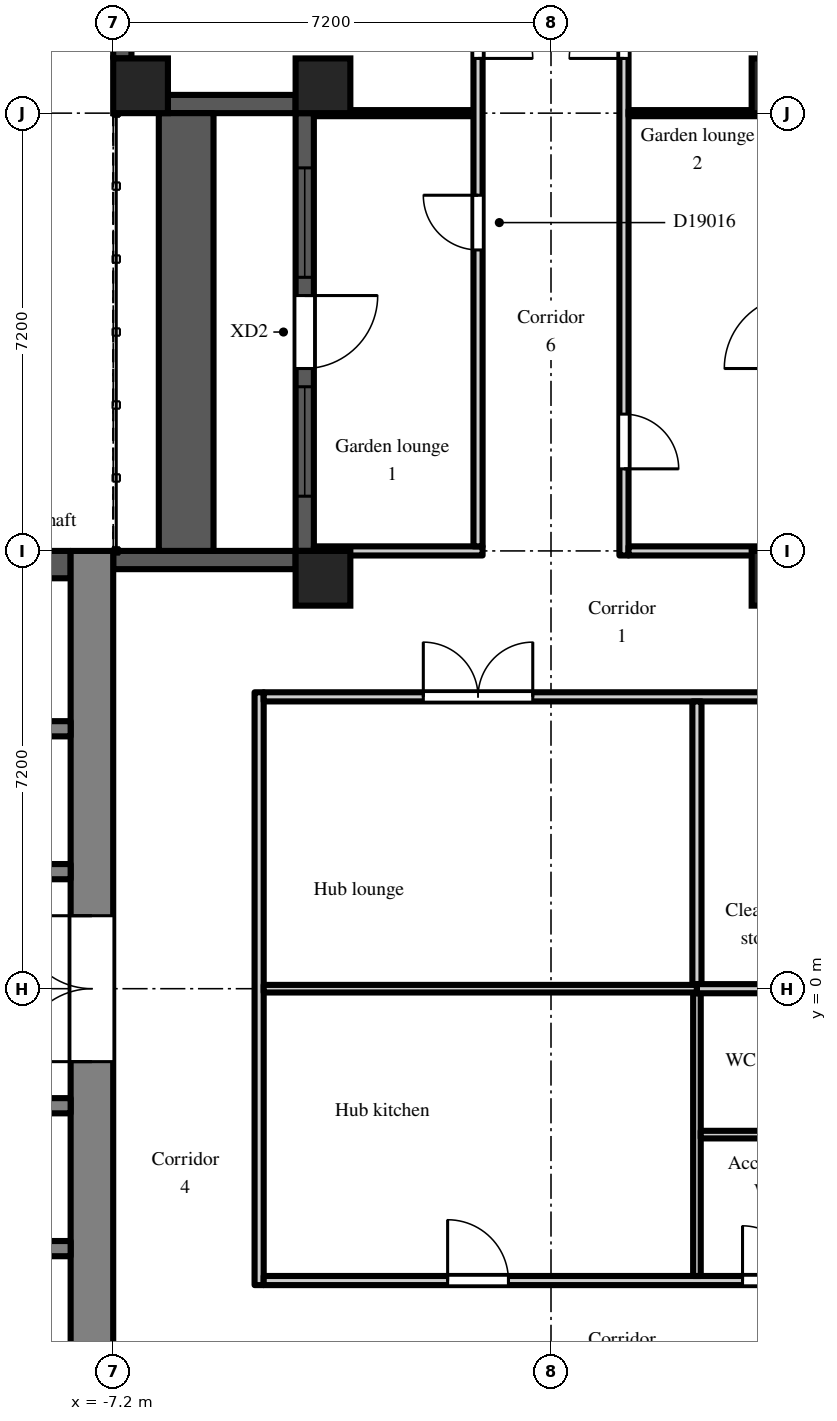
"""IFC4 building model, lengths in metres.
Left out: names, types, materials, properties, quantities, classifications, styles, units other than length and angle.
Written with IfcOpenShell. Run it as: python <this file> out.ifc"""

import sys

from ifc_helpers import new_model, si_unit, direction, frame, frame_2d, origin, origin_2d, place, context, subcontext, project, spatial, rectangle, extrude, element, fill, save


model = new_model("IFC4")
c1 = context("Model", 3, precision=1e-05, world=origin(), true_north=direction((0.0, 1.0)))
c2 = subcontext(c1, "Body", "Model", "MODEL_VIEW")
j1 = project(units=[si_unit("LENGTHUNIT", "METRE"), si_unit("PLANEANGLEUNIT", "RADIAN")], contexts=[c1])
p1 = place(None, origin())
s1 = spatial("IfcSite", under=j1, at=p1, CompositionType="ELEMENT")
p2 = place(p1, origin())
s2 = spatial("IfcBuilding", under=s1, at=p2, CompositionType="ELEMENT")
p3 = place(p2, frame((0.0, 0.0, 129.3)))
s3 = spatial("IfcBuildingStorey", under=s2, at=p3, CompositionType="ELEMENT", Elevation=129.3)
for number, where, z_axis, x_axis in (
    (1, (-6.75, 14.85, 0.0), (0.0, 0.0, 1.0), (1.0, 0.0, 0.0)),
    (2, (-3.75, 6.75, 0.0), (0.0, 0.0, 1.0), (1.0, 0.0, 0.0)),
    (3, (-3.75, 14.85, 0.0), (0.0, 0.0, 1.0), (1.0, 0.0, 0.0)),
    (4, (3.75, 6.75, 0.0), (0.0, 0.0, 1.0), (1.0, 0.0, 0.0)),
    (5, (3.75, 14.85, 0.0), (0.0, 0.0, 1.0), (1.0, 0.0, 0.0)),
):
    element("IfcColumn", number, at=place(p3, frame(where, z_axis=z_axis, x_axis=x_axis)), inside=s3, PredefinedType="COLUMN", context=c2, shape_type="SweptSolid", body=[
        extrude(rectangle(XDim=0.9, YDim=0.9, at=origin_2d()), origin(), (0.0, 0.0, 1.0), 3.0),
    ])
p4 = place(p3, frame((-7.05, 17.1, 0.0), z_axis=(0.0, 0.0, 1.0), x_axis=(0.0, -1.0, 0.0)))
e6 = element("IfcWall", 6, at=p4, inside=s3, PredefinedType="SOLIDWALL", context=c2, shape_type="SweptSolid", body=[
    extrude(rectangle(XDim=1.8, YDim=0.3, at=frame_2d((0.9, 0.0))), origin(), (0.0, 0.0, 1.0), 2.2),
])
p5 = place(p4, frame((0.3, 0.0, 0.2)))
e7 = element("IfcOpeningElement", 7, at=p5, cuts=e6, PredefinedType="OPENING", context=c2, shape_type="SweptSolid", body=[
    extrude(rectangle(XDim=1.2, YDim=1.85, at=frame_2d((0.6, 0.925))), frame((0.0, 0.16, 0.0), z_axis=(0.0, -1.0, 0.0), x_axis=(1.0, 0.0, 0.0)), (0.0, 0.0, 1.0), 0.32),
])
p6 = place(p3, frame((-6.3, 14.55, 0.0), z_axis=(0.0, 0.0, 1.0), x_axis=(1.0, 0.0, 0.0)))
e8 = element("IfcWall", 8, at=p6, inside=s3, PredefinedType="SOLIDWALL", context=c2, shape_type="SweptSolid", body=[
    extrude(rectangle(XDim=2.1, YDim=0.3, at=frame_2d((1.05, 0.0))), origin(), (0.0, 0.0, 1.0), 2.2),
])
p7 = place(p3, frame((-4.05, 14.4, 0.0), z_axis=(0.0, 0.0, 1.0), x_axis=(0.0, -1.0, 0.0)))
e9 = element("IfcWall", 9, at=p7, inside=s3, PredefinedType="SOLIDWALL", context=c2, shape_type="SweptSolid", body=[
    extrude(rectangle(XDim=7.2, YDim=0.3, at=frame_2d((3.6, 0.0))), origin(), (0.0, 0.0, 1.0), 2.2),
])
p8 = place(p7, frame((3.0, 0.0, 0.0)))
e10 = element("IfcOpeningElement", 10, at=p8, cuts=e9, PredefinedType="OPENING", context=c2, shape_type="SweptSolid", body=[
    extrude(rectangle(XDim=1.2, YDim=2.05, at=frame_2d((0.6, 1.025))), frame((0.0, 0.16, 0.0), z_axis=(0.0, -1.0, 0.0), x_axis=(1.0, 0.0, 0.0)), (0.0, 0.0, 1.0), 0.32),
])
p9 = place(p7, frame((0.9, 0.0, 0.2)))
e11 = element("IfcOpeningElement", 11, at=p9, cuts=e9, PredefinedType="OPENING", context=c2, shape_type="SweptSolid", body=[
    extrude(rectangle(XDim=1.8, YDim=1.85, at=frame_2d((0.9, 0.925))), frame((0.0, 0.16, 0.0), z_axis=(0.0, -1.0, 0.0), x_axis=(1.0, 0.0, 0.0)), (0.0, 0.0, 1.0), 0.32),
])
p10 = place(p7, frame((4.5, 0.0, 0.2)))
e12 = element("IfcOpeningElement", 12, at=p10, cuts=e9, PredefinedType="OPENING", context=c2, shape_type="SweptSolid", body=[
    extrude(rectangle(XDim=1.8, YDim=1.85, at=frame_2d((0.9, 0.925))), frame((0.0, 0.16, 0.0), z_axis=(0.0, -1.0, 0.0), x_axis=(1.0, 0.0, 0.0)), (0.0, 0.0, 1.0), 0.32),
])
p11 = place(p3, frame((-4.2, 7.05, 0.0), z_axis=(0.0, 0.0, 1.0), x_axis=(-1.0, 0.0, 0.0)))
e13 = element("IfcWall", 13, at=p11, inside=s3, PredefinedType="SOLIDWALL", context=c2, shape_type="SweptSolid", body=[
    extrude(rectangle(XDim=3.0, YDim=0.3, at=frame_2d((1.5, 0.0))), origin(), (0.0, 0.0, 1.0), 2.2),
])
p12 = place(p3, frame((-6.0, 7.2, 0.0), z_axis=(0.0, 0.0, 1.0), x_axis=(0.0, 1.0, 0.0)))
e14 = element("IfcWall", 14, at=p12, inside=s3, PredefinedType="PARAPET", context=c2, shape_type="SweptSolid", body=[
    extrude(rectangle(XDim=7.2, YDim=0.9, at=frame_2d((3.6, 0.0))), origin(), (0.0, 0.0, 1.0), 0.8),
])
p13 = place(p3, frame((-7.55, -7.2, 0.0), z_axis=(0.0, 0.0, 1.0), x_axis=(0.0, 1.0, 0.0)))
e15 = element("IfcWall", 15, at=p13, inside=s3, PredefinedType="SHEAR", context=c2, shape_type="SweptSolid", body=[
    extrude(rectangle(XDim=14.4, YDim=0.7, at=frame_2d((7.2, 0.0))), origin(), (0.0, 0.0, 1.0), 2.6),
])
p14 = place(p13, frame((6.0, 0.0, 0.0)))
e16 = element("IfcOpeningElement", 16, at=p14, cuts=e15, PredefinedType="OPENING", context=c2, shape_type="SweptSolid", body=[
    extrude(rectangle(XDim=2.4, YDim=2.2, at=frame_2d((1.2, 1.1))), frame((0.0, 0.36, 0.0), z_axis=(0.0, -1.0, 0.0), x_axis=(1.0, 0.0, 0.0)), (0.0, 0.0, 1.0), 0.72),
])
p15 = place(p3, frame((-7.9, 6.975, 0.0), z_axis=(0.0, 0.0, 1.0), x_axis=(-1.0, 0.0, 0.0)))
e17 = element("IfcWall", 17, at=p15, inside=s3, PredefinedType="SHEAR", context=c2, shape_type="SweptSolid", body=[
    extrude(rectangle(XDim=12.95, YDim=0.45, at=frame_2d((6.475, 0.0))), origin(), (0.0, 0.0, 1.0), 2.6),
])
p16 = place(p3, frame((-7.9, 1.925, 0.0), z_axis=(0.0, 0.0, 1.0), x_axis=(-1.0, 0.0, 0.0)))
e18 = element("IfcWall", 18, at=p16, inside=s3, PredefinedType="SHEAR", context=c2, shape_type="SweptSolid", body=[
    extrude(rectangle(XDim=12.95, YDim=0.25, at=frame_2d((6.475, 0.0))), origin(), (0.0, 0.0, 1.0), 2.6),
])
p17 = place(p16, frame((4.825, 0.0, 0.0)))
e19 = element("IfcOpeningElement", 19, at=p17, cuts=e18, PredefinedType="OPENING", context=c2, shape_type="SweptSolid", body=[
    extrude(rectangle(XDim=1.1, YDim=2.1, at=frame_2d((0.55, 1.05))), frame((0.0, 0.135, 0.0), z_axis=(0.0, -1.0, 0.0), x_axis=(1.0, 0.0, 0.0)), (0.0, 0.0, 1.0), 0.27),
])
p18 = place(p16, frame((7.025, 0.0, 0.0)))
e20 = element("IfcOpeningElement", 20, at=p18, cuts=e18, PredefinedType="OPENING", context=c2, shape_type="SweptSolid", body=[
    extrude(rectangle(XDim=1.1, YDim=2.1, at=frame_2d((0.55, 1.05))), frame((0.0, 0.135, 0.0), z_axis=(0.0, -1.0, 0.0), x_axis=(1.0, 0.0, 0.0)), (0.0, 0.0, 1.0), 0.27),
])
p19 = place(p16, frame((9.225, 0.0, 0.0)))
e21 = element("IfcOpeningElement", 21, at=p19, cuts=e18, PredefinedType="OPENING", context=c2, shape_type="SweptSolid", body=[
    extrude(rectangle(XDim=1.1, YDim=2.1, at=frame_2d((0.55, 1.05))), frame((0.0, 0.135, 0.0), z_axis=(0.0, -1.0, 0.0), x_axis=(1.0, 0.0, 0.0)), (0.0, 0.0, 1.0), 0.27),
])
p20 = place(p16, frame((0.525, 0.0, 0.0)))
e22 = element("IfcOpeningElement", 22, at=p20, cuts=e18, PredefinedType="OPENING", context=c2, shape_type="SweptSolid", body=[
    extrude(rectangle(XDim=0.9, YDim=2.1, at=frame_2d((0.45, 1.05))), frame((0.0, 0.135, 0.0), z_axis=(0.0, -1.0, 0.0), x_axis=(1.0, 0.0, 0.0)), (0.0, 0.0, 1.0), 0.27),
])
p21 = place(p16, frame((2.625, 0.0, 0.0)))
e23 = element("IfcOpeningElement", 23, at=p21, cuts=e18, PredefinedType="OPENING", context=c2, shape_type="SweptSolid", body=[
    extrude(rectangle(XDim=1.1, YDim=2.1, at=frame_2d((0.55, 1.05))), frame((0.0, 0.135, 0.0), z_axis=(0.0, -1.0, 0.0), x_axis=(1.0, 0.0, 0.0)), (0.0, 0.0, 1.0), 0.27),
])
p22 = place(p16, frame((11.525, 0.0, 0.0)))
e24 = element("IfcOpeningElement", 24, at=p22, cuts=e18, PredefinedType="OPENING", context=c2, shape_type="SweptSolid", body=[
    extrude(rectangle(XDim=0.9, YDim=2.1, at=frame_2d((0.45, 1.05))), frame((0.0, 0.135, 0.0), z_axis=(0.0, -1.0, 0.0), x_axis=(1.0, 0.0, 0.0)), (0.0, 0.0, 1.0), 0.27),
])
p23 = place(p3, frame((-7.9, 4.275, 0.0), z_axis=(0.0, 0.0, 1.0), x_axis=(-1.0, 0.0, 0.0)))
e25 = element("IfcWall", 25, at=p23, inside=s3, PredefinedType="SHEAR", context=c2, shape_type="SweptSolid", body=[
    extrude(rectangle(XDim=1.95, YDim=0.25, at=frame_2d((0.975, 0.0))), origin(), (0.0, 0.0, 1.0), 2.6),
])
p24 = place(p3, frame((-7.9, -1.925, 0.0), z_axis=(0.0, 0.0, 1.0), x_axis=(-1.0, 0.0, 0.0)))
e26 = element("IfcWall", 26, at=p24, inside=s3, PredefinedType="SHEAR", context=c2, shape_type="SweptSolid", body=[
    extrude(rectangle(XDim=12.95, YDim=0.25, at=frame_2d((6.475, 0.0))), origin(), (0.0, 0.0, 1.0), 2.6),
])
p25 = place(p24, frame((0.525, 0.0, 0.0)))
e27 = element("IfcOpeningElement", 27, at=p25, cuts=e26, PredefinedType="OPENING", context=c2, shape_type="SweptSolid", body=[
    extrude(rectangle(XDim=0.9, YDim=2.1, at=frame_2d((0.45, 1.05))), frame((0.0, 0.135, 0.0), z_axis=(0.0, -1.0, 0.0), x_axis=(1.0, 0.0, 0.0)), (0.0, 0.0, 1.0), 0.27),
])
p26 = place(p24, frame((2.625, 0.0, 0.0)))
e28 = element("IfcOpeningElement", 28, at=p26, cuts=e26, PredefinedType="OPENING", context=c2, shape_type="SweptSolid", body=[
    extrude(rectangle(XDim=1.1, YDim=2.1, at=frame_2d((0.55, 1.05))), frame((0.0, 0.135, 0.0), z_axis=(0.0, -1.0, 0.0), x_axis=(1.0, 0.0, 0.0)), (0.0, 0.0, 1.0), 0.27),
])
p27 = place(p24, frame((8.225, 0.0, 0.0)))
e29 = element("IfcOpeningElement", 29, at=p27, cuts=e26, PredefinedType="OPENING", context=c2, shape_type="SweptSolid", body=[
    extrude(rectangle(XDim=0.9, YDim=2.1, at=frame_2d((0.45, 1.05))), frame((0.0, 0.135, 0.0), z_axis=(0.0, -1.0, 0.0), x_axis=(1.0, 0.0, 0.0)), (0.0, 0.0, 1.0), 0.27),
])
p28 = place(p3, frame((-7.9, -4.275, 0.0), z_axis=(0.0, 0.0, 1.0), x_axis=(-1.0, 0.0, 0.0)))
e30 = element("IfcWall", 30, at=p28, inside=s3, PredefinedType="SHEAR", context=c2, shape_type="SweptSolid", body=[
    extrude(rectangle(XDim=1.95, YDim=0.25, at=frame_2d((0.975, 0.0))), origin(), (0.0, 0.0, 1.0), 2.6),
])
p29 = place(p3, frame((-4.8, -4.875, 0.0), z_axis=(0.0, 0.0, 1.0), x_axis=(0.0, 1.0, 0.0)))
e31 = element("IfcWall", 31, at=p29, inside=s3, PredefinedType="PARTITIONING", context=c2, shape_type="SweptSolid", body=[
    extrude(rectangle(XDim=9.75, YDim=0.15, at=frame_2d((4.875, 0.0))), origin(), (0.0, 0.0, 1.0), 2.6),
])
p30 = place(p3, frame((-4.725, -4.8, 0.0), z_axis=(0.0, 0.0, 1.0), x_axis=(1.0, 0.0, 0.0)))
e32 = element("IfcWall", 32, at=p30, inside=s3, PredefinedType="PARTITIONING", context=c2, shape_type="SweptSolid", body=[
    extrude(rectangle(XDim=9.6, YDim=0.15, at=frame_2d((4.8, 0.0))), origin(), (0.0, 0.0, 1.0), 2.6),
])
p31 = place(p30, frame((7.875, 0.0, 0.0)))
e33 = element("IfcOpeningElement", 33, at=p31, cuts=e32, PredefinedType="OPENING", context=c2, shape_type="SweptSolid", body=[
    extrude(rectangle(XDim=0.9, YDim=2.1, at=frame_2d((0.45, 1.05))), frame((0.0, 0.085, 0.0), z_axis=(0.0, -1.0, 0.0), x_axis=(1.0, 0.0, 0.0)), (0.0, 0.0, 1.0), 0.17),
])
p32 = place(p30, frame((3.025, 0.0, 0.0)))
e34 = element("IfcOpeningElement", 34, at=p32, cuts=e32, PredefinedType="OPENING", context=c2, shape_type="SweptSolid", body=[
    extrude(rectangle(XDim=1.0, YDim=2.1, at=frame_2d((0.5, 1.05))), frame((0.0, 0.085, 0.0), z_axis=(0.0, -1.0, 0.0), x_axis=(1.0, 0.0, 0.0)), (0.0, 0.0, 1.0), 0.17),
])
p33 = place(p3, frame((-4.725, 0.0, 0.0), z_axis=(0.0, 0.0, 1.0), x_axis=(1.0, 0.0, 0.0)))
e35 = element("IfcWall", 35, at=p33, inside=s3, PredefinedType="PARTITIONING", context=c2, shape_type="SweptSolid", body=[
    extrude(rectangle(XDim=7.125, YDim=0.125, at=frame_2d((3.562, 0.0))), origin(), (0.0, 0.0, 1.0), 2.6),
])
p34 = place(p3, frame((-4.725, 4.8, 0.0), z_axis=(0.0, 0.0, 1.0), x_axis=(1.0, 0.0, 0.0)))
e36 = element("IfcWall", 36, at=p34, inside=s3, PredefinedType="PARTITIONING", context=c2, shape_type="SweptSolid", body=[
    extrude(rectangle(XDim=9.6, YDim=0.15, at=frame_2d((4.8, 0.0))), origin(), (0.0, 0.0, 1.0), 2.6),
])
p35 = place(p34, frame((2.625, 0.0, 0.0)))
e37 = element("IfcOpeningElement", 37, at=p35, cuts=e36, PredefinedType="OPENING", context=c2, shape_type="SweptSolid", body=[
    extrude(rectangle(XDim=1.8, YDim=2.1, at=frame_2d((0.9, 1.05))), frame((0.0, 0.085, 0.0), z_axis=(0.0, -1.0, 0.0), x_axis=(1.0, 0.0, 0.0)), (0.0, 0.0, 1.0), 0.17),
])
p36 = place(p3, frame((-3.9, 7.2, 0.0), z_axis=(0.0, 0.0, 1.0), x_axis=(1.0, 0.0, 0.0)))
e38 = element("IfcWall", 38, at=p36, inside=s3, PredefinedType="PARTITIONING", context=c2, shape_type="SweptSolid", body=[
    extrude(rectangle(XDim=2.775, YDim=0.15, at=frame_2d((1.387, 0.0))), origin(), (0.0, 0.0, 1.0), 2.6),
])
p37 = place(p3, frame((-3.9, 14.4, 0.0), z_axis=(0.0, 0.0, 1.0), x_axis=(1.0, 0.0, 0.0)))
e39 = element("IfcWall", 39, at=p37, inside=s3, PredefinedType="PARTITIONING", context=c2, shape_type="SweptSolid", body=[
    extrude(rectangle(XDim=2.625, YDim=0.1, at=frame_2d((1.312, 0.0))), origin(), (0.0, 0.0, 1.0), 2.6),
])
p38 = place(p3, frame((-1.2, 7.275, 0.0), z_axis=(0.0, 0.0, 1.0), x_axis=(0.0, 1.0, 0.0)))
e40 = element("IfcWall", 40, at=p38, inside=s3, PredefinedType="PARTITIONING", context=c2, shape_type="SweptSolid", body=[
    extrude(rectangle(XDim=10.65, YDim=0.15, at=frame_2d((5.325, 0.0))), origin(), (0.0, 0.0, 1.0), 2.6),
])
p39 = place(p38, frame((4.875, 0.0, 0.0)))
e41 = element("IfcOpeningElement", 41, at=p39, cuts=e40, PredefinedType="OPENING", context=c2, shape_type="SweptSolid", body=[
    extrude(rectangle(XDim=0.9, YDim=2.1, at=frame_2d((0.45, 1.05))), frame((0.0, 0.085, 0.0), z_axis=(0.0, -1.0, 0.0), x_axis=(1.0, 0.0, 0.0)), (0.0, 0.0, 1.0), 0.17),
])
p40 = place(p38, frame((8.025, 0.0, 0.0)))
e42 = element("IfcOpeningElement", 42, at=p40, cuts=e40, PredefinedType="OPENING", context=c2, shape_type="SweptSolid", body=[
    extrude(rectangle(XDim=1.8, YDim=2.1, at=frame_2d((0.9, 1.05))), frame((0.0, 0.085, 0.0), z_axis=(0.0, -1.0, 0.0), x_axis=(1.0, 0.0, 0.0)), (0.0, 0.0, 1.0), 0.17),
])
p41 = place(p3, frame((1.2, 7.125, 0.0), z_axis=(0.0, 0.0, 1.0), x_axis=(0.0, 1.0, 0.0)))
e43 = element("IfcWall", 43, at=p41, inside=s3, PredefinedType="PARTITIONING", context=c2, shape_type="SweptSolid", body=[
    extrude(rectangle(XDim=10.8, YDim=0.15, at=frame_2d((5.4, 0.0))), origin(), (0.0, 0.0, 1.0), 2.6),
])
p42 = place(p41, frame((1.425, 0.0, 0.0)))
e44 = element("IfcOpeningElement", 44, at=p42, cuts=e43, PredefinedType="OPENING", context=c2, shape_type="SweptSolid", body=[
    extrude(rectangle(XDim=0.9, YDim=2.1, at=frame_2d((0.45, 1.05))), frame((0.0, 0.085, 0.0), z_axis=(0.0, -1.0, 0.0), x_axis=(1.0, 0.0, 0.0)), (0.0, 0.0, 1.0), 0.17),
])
p43 = place(p41, frame((8.175, 0.0, 0.0)))
e45 = element("IfcOpeningElement", 45, at=p43, cuts=e43, PredefinedType="OPENING", context=c2, shape_type="SweptSolid", body=[
    extrude(rectangle(XDim=1.8, YDim=2.1, at=frame_2d((0.9, 1.05))), frame((0.0, 0.085, 0.0), z_axis=(0.0, -1.0, 0.0), x_axis=(1.0, 0.0, 0.0)), (0.0, 0.0, 1.0), 0.17),
])
p44 = place(p3, frame((1.275, 7.2, 0.0), z_axis=(0.0, 0.0, 1.0), x_axis=(1.0, 0.0, 0.0)))
e46 = element("IfcWall", 46, at=p44, inside=s3, PredefinedType="PARTITIONING", context=c2, shape_type="SweptSolid", body=[
    extrude(rectangle(XDim=2.625, YDim=0.15, at=frame_2d((1.312, 0.0))), origin(), (0.0, 0.0, 1.0), 2.6),
])
p45 = place(p3, frame((1.275, 14.4, 0.0), z_axis=(0.0, 0.0, 1.0), x_axis=(1.0, 0.0, 0.0)))
e47 = element("IfcWall", 47, at=p45, inside=s3, PredefinedType="PARTITIONING", context=c2, shape_type="SweptSolid", body=[
    extrude(rectangle(XDim=2.625, YDim=0.1, at=frame_2d((1.312, 0.0))), origin(), (0.0, 0.0, 1.0), 2.6),
])
p46 = place(p3, frame((2.4, -4.725, 0.0), z_axis=(0.0, 0.0, 1.0), x_axis=(0.0, 1.0, 0.0)))
e48 = element("IfcWall", 48, at=p46, inside=s3, PredefinedType="PARTITIONING", context=c2, shape_type="SweptSolid", body=[
    extrude(rectangle(XDim=4.65, YDim=0.125, at=frame_2d((2.325, 0.0))), origin(), (0.0, 0.0, 1.0), 2.6),
])
p47 = place(p3, frame((2.462, -2.4, 0.0), z_axis=(0.0, 0.0, 1.0), x_axis=(1.0, 0.0, 0.0)))
e49 = element("IfcWall", 49, at=p47, inside=s3, PredefinedType="PARTITIONING", context=c2, shape_type="SweptSolid", body=[
    extrude(rectangle(XDim=2.263, YDim=0.125, at=frame_2d((1.131, 0.0))), origin(), (0.0, 0.0, 1.0), 2.6),
])
p48 = place(p3, frame((2.4, 0.075, 0.0), z_axis=(0.0, 0.0, 1.0), x_axis=(0.0, 1.0, 0.0)))
e50 = element("IfcWall", 50, at=p48, inside=s3, PredefinedType="PARTITIONING", context=c2, shape_type="SweptSolid", body=[
    extrude(rectangle(XDim=4.65, YDim=0.15, at=frame_2d((2.325, 0.0))), origin(), (0.0, 0.0, 1.0), 2.6),
])
p49 = place(p3, frame((2.4, 0.0, 0.0), z_axis=(0.0, 0.0, 1.0), x_axis=(1.0, 0.0, 0.0)))
e51 = element("IfcWall", 51, at=p49, inside=s3, PredefinedType="PARTITIONING", context=c2, shape_type="SweptSolid", body=[
    extrude(rectangle(XDim=2.325, YDim=0.15, at=frame_2d((1.163, 0.0))), origin(), (0.0, 0.0, 1.0), 2.6),
])
p50 = place(p8, origin())
e52 = element("IfcDoor", 52, at=p50, inside=s3, OperationType="SINGLE_SWING_LEFT", PredefinedType="DOOR", context=c2, shape_type="SweptSolid", body=[
    extrude(rectangle(XDim=1.2, YDim=2.05, at=frame_2d((0.6, 1.025))), frame((0.0, 0.025, 0.0), z_axis=(0.0, -1.0, 0.0), x_axis=(1.0, 0.0, 0.0)), (0.0, 0.0, 1.0), 0.05),
])
fill(e10, e52)
p51 = place(p9, origin())
e53 = element("IfcWindow", 53, at=p51, inside=s3, PartitioningType="SINGLE_PANEL", PredefinedType="WINDOW", context=c2, shape_type="SweptSolid", body=[
    extrude(rectangle(XDim=1.8, YDim=1.85, at=frame_2d((0.9, 0.925))), frame((0.0, 0.03, 0.0), z_axis=(0.0, -1.0, 0.0), x_axis=(1.0, 0.0, 0.0)), (0.0, 0.0, 1.0), 0.06),
])
fill(e11, e53)
p52 = place(p10, origin())
e54 = element("IfcWindow", 54, at=p52, inside=s3, PartitioningType="SINGLE_PANEL", PredefinedType="WINDOW", context=c2, shape_type="SweptSolid", body=[
    extrude(rectangle(XDim=1.8, YDim=1.85, at=frame_2d((0.9, 0.925))), frame((0.0, 0.03, 0.0), z_axis=(0.0, -1.0, 0.0), x_axis=(1.0, 0.0, 0.0)), (0.0, 0.0, 1.0), 0.06),
])
fill(e12, e54)
p53 = place(p14, origin())
e55 = element("IfcDoor", 55, at=p53, inside=s3, OperationType="DOUBLE_DOOR_DOUBLE_SWING", PredefinedType="DOOR", context=c2, shape_type="SweptSolid", body=[
    extrude(rectangle(XDim=2.4, YDim=2.2, at=frame_2d((1.2, 1.1))), frame((0.0, 0.025, 0.0), z_axis=(0.0, -1.0, 0.0), x_axis=(1.0, 0.0, 0.0)), (0.0, 0.0, 1.0), 0.05),
])
fill(e16, e55)
p54 = place(p31, origin())
e56 = element("IfcDoor", 56, at=p54, inside=s3, OperationType="SINGLE_SWING_LEFT", PredefinedType="DOOR", context=c2, shape_type="SweptSolid", body=[
    extrude(rectangle(XDim=0.9, YDim=2.1, at=frame_2d((0.45, 1.05))), frame((0.0, 0.025, 0.0), z_axis=(0.0, -1.0, 0.0), x_axis=(1.0, 0.0, 0.0)), (0.0, 0.0, 1.0), 0.05),
])
fill(e33, e56)
p55 = place(p32, origin())
e57 = element("IfcDoor", 57, at=p55, inside=s3, OperationType="SINGLE_SWING_LEFT", PredefinedType="DOOR", context=c2, shape_type="SweptSolid", body=[
    extrude(rectangle(XDim=1.0, YDim=2.1, at=frame_2d((0.5, 1.05))), frame((0.0, 0.025, 0.0), z_axis=(0.0, -1.0, 0.0), x_axis=(1.0, 0.0, 0.0)), (0.0, 0.0, 1.0), 0.05),
])
fill(e34, e57)
p56 = place(p35, origin())
e58 = element("IfcDoor", 58, at=p56, inside=s3, OperationType="DOUBLE_DOOR_DOUBLE_SWING", PredefinedType="DOOR", context=c2, shape_type="SweptSolid", body=[
    extrude(rectangle(XDim=1.8, YDim=2.1, at=frame_2d((0.9, 1.05))), frame((0.0, 0.025, 0.0), z_axis=(0.0, -1.0, 0.0), x_axis=(1.0, 0.0, 0.0)), (0.0, 0.0, 1.0), 0.05),
])
fill(e37, e58)
p57 = place(p39, origin())
e59 = element("IfcDoor", 59, at=p57, inside=s3, OperationType="SINGLE_SWING_RIGHT", PredefinedType="DOOR", context=c2, shape_type="SweptSolid", body=[
    extrude(rectangle(XDim=0.9, YDim=2.1, at=frame_2d((0.45, 1.05))), frame((0.0, 0.025, 0.0), z_axis=(0.0, -1.0, 0.0), x_axis=(1.0, 0.0, 0.0)), (0.0, 0.0, 1.0), 0.05),
])
fill(e41, e59)
p58 = place(p40, frame((1.8, 0.0, 0.0), z_axis=(0.0, 0.0, 1.0), x_axis=(-1.0, 0.0, 0.0)))
e60 = element("IfcDoor", 60, at=p58, inside=s3, OperationType="DOUBLE_DOOR_DOUBLE_SWING", PredefinedType="DOOR", context=c2, shape_type="SweptSolid", body=[
    extrude(rectangle(XDim=1.8, YDim=2.1, at=frame_2d((0.9, 1.05))), frame((0.0, 0.025, 0.0), z_axis=(0.0, -1.0, 0.0), x_axis=(1.0, 0.0, 0.0)), (0.0, 0.0, 1.0), 0.05),
])
fill(e42, e60)
p59 = place(p42, frame((0.9, 0.0, 0.0), z_axis=(0.0, 0.0, 1.0), x_axis=(-1.0, 0.0, 0.0)))
e61 = element("IfcDoor", 61, at=p59, inside=s3, OperationType="SINGLE_SWING_RIGHT", PredefinedType="DOOR", context=c2, shape_type="SweptSolid", body=[
    extrude(rectangle(XDim=0.9, YDim=2.1, at=frame_2d((0.45, 1.05))), frame((0.0, 0.025, 0.0), z_axis=(0.0, -1.0, 0.0), x_axis=(1.0, 0.0, 0.0)), (0.0, 0.0, 1.0), 0.05),
])
fill(e44, e61)
p60 = place(p43, origin())
e62 = element("IfcDoor", 62, at=p60, inside=s3, OperationType="DOUBLE_DOOR_DOUBLE_SWING", PredefinedType="DOOR", context=c2, shape_type="SweptSolid", body=[
    extrude(rectangle(XDim=1.8, YDim=2.1, at=frame_2d((0.9, 1.05))), frame((0.0, 0.025, 0.0), z_axis=(0.0, -1.0, 0.0), x_axis=(1.0, 0.0, 0.0)), (0.0, 0.0, 1.0), 0.05),
])
fill(e45, e62)
save(model, sys.argv[1])
